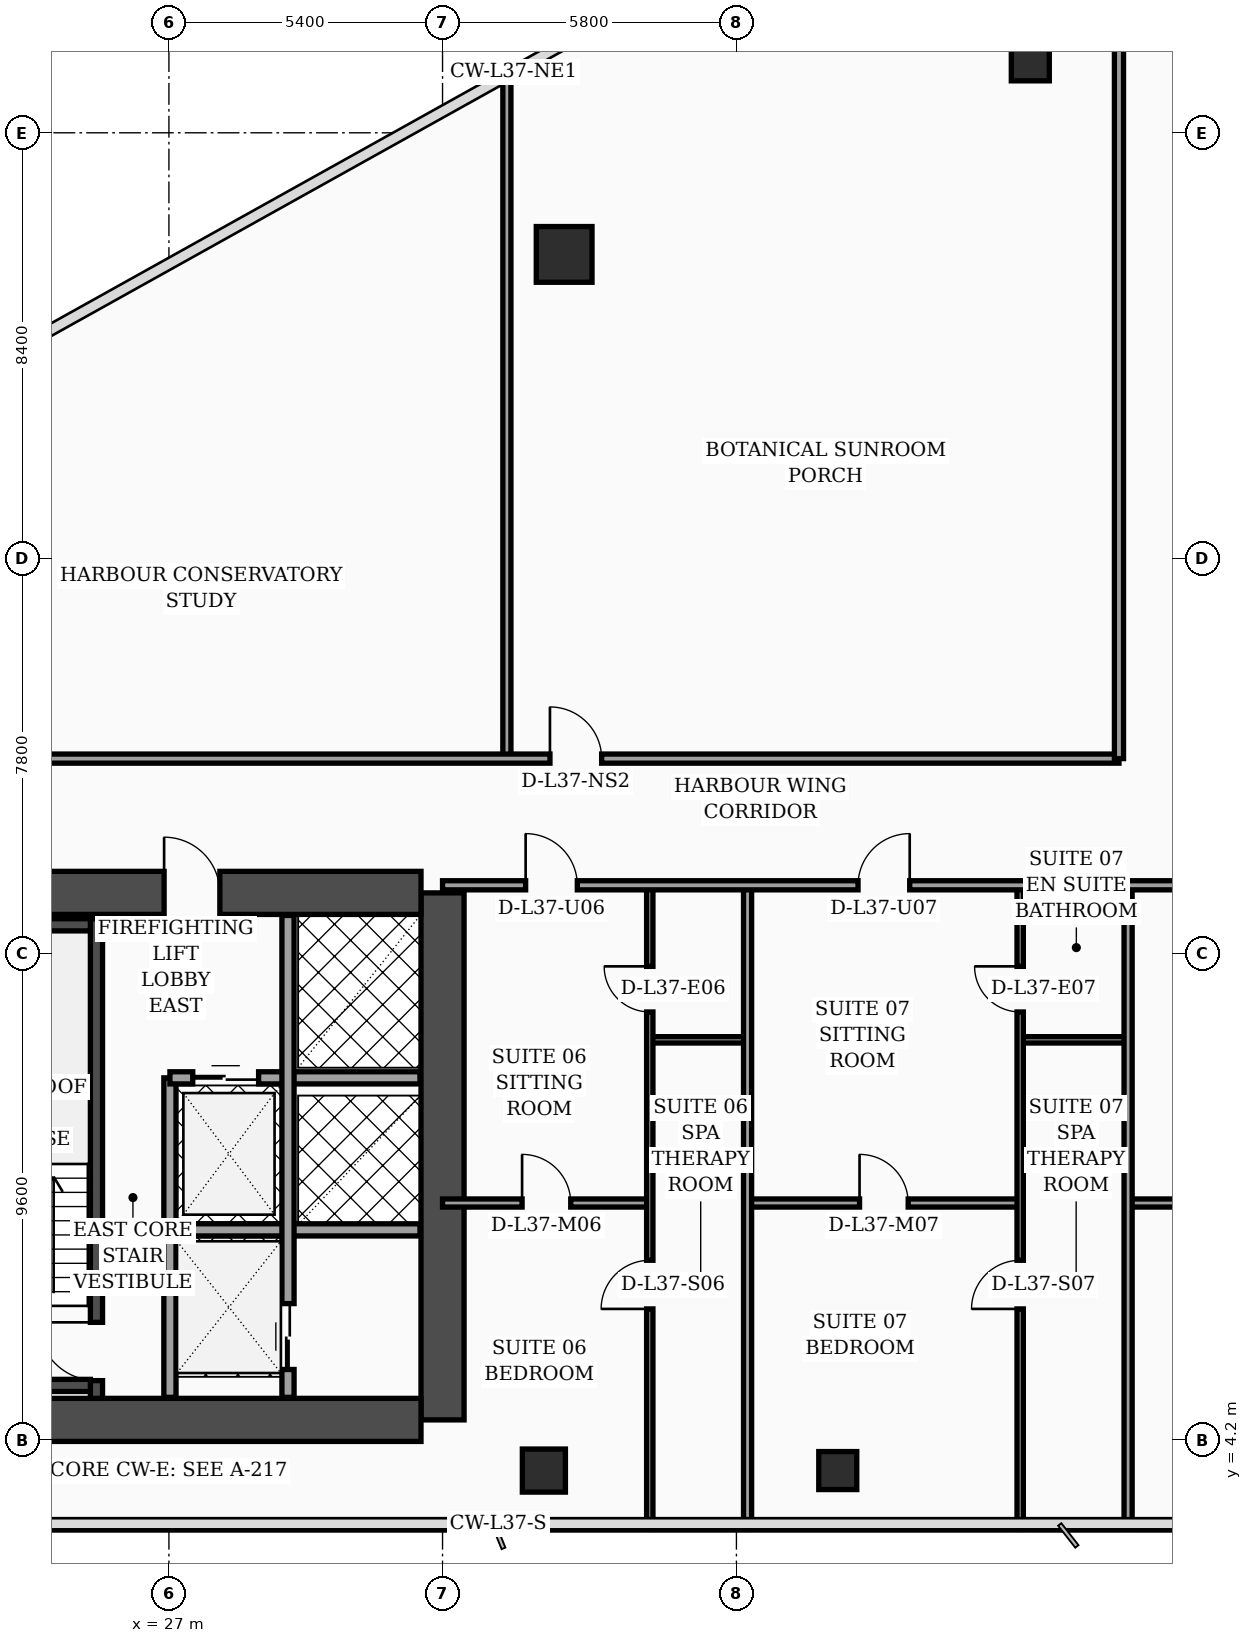
"""IFC4 building model, lengths in metres.
Left out: names, types, materials, properties, quantities, classifications, styles, units other than length and angle.
Written with IfcOpenShell. Run it as: python <this file> out.ifc"""

import sys

from ifc_helpers import new_model, si_unit, direction, frame, frame_2d, origin, origin_2d, place, context, subcontext, project, spatial, rectangle, hollow_rectangle, circle, extrude, element, fill, save


model = new_model("IFC4")
c1 = context("Model", 3, precision=1e-05, world=origin(), true_north=direction((0.0, 1.0)))
c2 = subcontext(c1, "Body", "Model", "MODEL_VIEW")
j1 = project(units=[si_unit("LENGTHUNIT", "METRE"), si_unit("PLANEANGLEUNIT", "RADIAN")], contexts=[c1])
p1 = place(None, origin())
s1 = spatial("IfcSite", under=j1, at=p1, CompositionType="ELEMENT")
p2 = place(p1, origin())
s2 = spatial("IfcBuilding", under=s1, at=p2, CompositionType="ELEMENT")
p3 = place(p2, frame((0.0, 0.0, 152.3)))
s3 = spatial("IfcBuildingStorey", under=s2, at=p3, CompositionType="ELEMENT", Elevation=152.3)
p4 = place(p3, frame((32.4, 4.6, 0.0), z_axis=(0.0, 0.0, 1.0), x_axis=(0.0, 1.0, 0.0)))
e1 = element("IfcWall", 1, at=p4, inside=s3, PredefinedType="SHEAR", context=c2, shape_type="SweptSolid", body=[
    extrude(rectangle(XDim=10.4, YDim=0.85, at=frame_2d((5.2, 0.0))), origin(), (0.0, 0.0, 1.0), 3.56),
])
p5 = place(p3, frame((22.025, 15.0, 0.0), z_axis=(0.0, 0.0, 1.0), x_axis=(1.0, 0.0, 0.0)))
e2 = element("IfcWall", 2, at=p5, inside=s3, PredefinedType="SHEAR", context=c2, shape_type="SweptSolid", body=[
    extrude(rectangle(XDim=9.95, YDim=0.85, at=frame_2d((4.975, 0.0))), origin(), (0.0, 0.0, 1.0), 3.56),
])
p6 = place(p5, frame((4.88, 0.0, 0.0)))
e3 = element("IfcOpeningElement", 3, at=p6, cuts=e2, PredefinedType="OPENING", context=c2, shape_type="SweptSolid", body=[
    extrude(rectangle(XDim=1.1, YDim=2.2, at=frame_2d((0.55, 1.1))), frame((0.0, 0.435, 0.0), z_axis=(0.0, -1.0, 0.0), x_axis=(1.0, 0.0, 0.0)), (0.0, 0.0, 1.0), 0.87),
])
p7 = place(p3, frame((22.025, 4.6, 0.0), z_axis=(0.0, 0.0, 1.0), x_axis=(1.0, 0.0, 0.0)))
e4 = element("IfcWall", 4, at=p7, inside=s3, PredefinedType="SHEAR", context=c2, shape_type="SweptSolid", body=[
    extrude(rectangle(XDim=9.95, YDim=0.85, at=frame_2d((4.975, 0.0))), origin(), (0.0, 0.0, 1.0), 3.56),
])
p8 = place(p3, frame((25.57, 5.025, 0.0), z_axis=(0.0, 0.0, 1.0), x_axis=(0.0, 1.0, 0.0)))
e5 = element("IfcWall", 5, at=p8, inside=s3, PredefinedType="SOLIDWALL", context=c2, shape_type="SweptSolid", body=[
    extrude(rectangle(XDim=9.465, YDim=0.24, at=frame_2d((4.732, 0.0))), origin(), (0.0, 0.0, 1.0), 3.56),
])
p9 = place(p8, frame((0.35, 0.0, 0.0)))
e6 = element("IfcOpeningElement", 6, at=p9, cuts=e5, PredefinedType="OPENING", context=c2, shape_type="SweptSolid", body=[
    extrude(rectangle(XDim=1.15, YDim=2.2, at=frame_2d((0.575, 1.1))), frame((0.0, 0.13, 0.0), z_axis=(0.0, -1.0, 0.0), x_axis=(1.0, 0.0, 0.0)), (0.0, 0.0, 1.0), 0.26),
])
for number, where, z_axis, x_axis in (
    (7, (22.35, 5.28, 0.0), (0.0, 0.0, 1.0), (1.0, 0.0, 0.0)),
    (8, (22.35, 14.37, 0.0), (0.0, 0.0, 1.0), (1.0, 0.0, 0.0)),
):
    element("IfcWall", number, at=place(p3, frame(where, z_axis=z_axis, x_axis=x_axis)), inside=s3, PredefinedType="SOLIDWALL", context=c2, shape_type="SweptSolid", body=[
        extrude(rectangle(XDim=3.1, YDim=0.24, at=frame_2d((1.55, 0.0))), origin(), (0.0, 0.0, 1.0), 3.56),
    ])
p10 = place(p3, frame((34.4, 3.6, 0.0), z_axis=(0.0, 0.0, 1.0), x_axis=(1.0, 0.0, 0.0)))
e9 = element("IfcColumn", 9, at=p10, inside=s3, PredefinedType="COLUMN", context=c2, shape_type="SweptSolid", body=[
    extrude(hollow_rectangle(XDim=0.85, YDim=0.85, WallThickness=0.036, at=origin_2d()), origin(), (0.0, 0.0, 1.0), 3.56),
])
p11 = place(p3, frame((40.2, 3.6, 0.0), z_axis=(0.0, 0.0, 1.0), x_axis=(1.0, 0.0, 0.0)))
e10 = element("IfcColumn", 10, at=p11, inside=s3, PredefinedType="COLUMN", context=c2, shape_type="SweptSolid", body=[
    extrude(hollow_rectangle(XDim=0.75, YDim=0.75, WallThickness=0.032, at=origin_2d()), origin(), (0.0, 0.0, 1.0), 3.56),
])
p12 = place(p3, frame((34.8, 27.6, 0.0), z_axis=(0.0, 0.0, 1.0), x_axis=(1.0, 0.0, 0.0)))
e11 = element("IfcColumn", 11, at=p12, inside=s3, PredefinedType="COLUMN", context=c2, shape_type="SweptSolid", body=[
    extrude(circle(Radius=0.55, at=origin_2d()), origin(), (0.0, 0.0, 1.0), 3.56),
])
p13 = place(p3, frame((44.0, 31.4, 0.0), z_axis=(0.0, 0.0, 1.0), x_axis=(1.0, 0.0, 0.0)))
e12 = element("IfcColumn", 12, at=p13, inside=s3, PredefinedType="COLUMN", context=c2, shape_type="SweptSolid", body=[
    extrude(hollow_rectangle(XDim=0.75, YDim=0.75, WallThickness=0.032, at=origin_2d()), origin(), (0.0, 0.0, 1.0), 3.56),
])
p14 = place(p3, frame((27.02, 5.045, 0.0), z_axis=(0.0, 0.0, 1.0), x_axis=(0.0, 1.0, 0.0)))
e13 = element("IfcWall", 13, at=p14, inside=s3, PredefinedType="SOLIDWALL", context=c2, shape_type="SweptSolid", body=[
    extrude(rectangle(XDim=6.305, YDim=0.24, at=frame_2d((3.153, 0.0))), origin(), (0.0, 0.0, 1.0), 3.56),
])
p15 = place(p3, frame((27.02, 11.35, 0.0), z_axis=(0.0, 0.0, 1.0), x_axis=(1.0, 0.0, 0.0)))
e14 = element("IfcWall", 14, at=p15, inside=s3, PredefinedType="SOLIDWALL", context=c2, shape_type="SweptSolid", body=[
    extrude(rectangle(XDim=4.935, YDim=0.24, at=frame_2d((2.468, 0.0))), origin(), (0.0, 0.0, 1.0), 3.56),
])
p16 = place(p15, frame((0.45, 0.0, 0.0)))
e15 = element("IfcOpeningElement", 15, at=p16, cuts=e14, PredefinedType="OPENING", context=c2, shape_type="SweptSolid", body=[
    extrude(rectangle(XDim=1.3, YDim=2.35, at=frame_2d((0.65, 1.175))), frame((0.0, 0.13, 0.0), z_axis=(0.0, -1.0, 0.0), x_axis=(1.0, 0.0, 0.0)), (0.0, 0.0, 1.0), 0.26),
])
p17 = place(p3, frame((27.02, 8.35, 0.0), z_axis=(0.0, 0.0, 1.0), x_axis=(1.0, 0.0, 0.0)))
e16 = element("IfcWall", 16, at=p17, inside=s3, PredefinedType="SOLIDWALL", context=c2, shape_type="SweptSolid", body=[
    extrude(rectangle(XDim=4.935, YDim=0.24, at=frame_2d((2.468, 0.0))), origin(), (0.0, 0.0, 1.0), 3.56),
])
p18 = place(p3, frame((29.35, 5.045, 0.0), z_axis=(0.0, 0.0, 1.0), x_axis=(0.0, 1.0, 0.0)))
e17 = element("IfcWall", 17, at=p18, inside=s3, PredefinedType="SOLIDWALL", context=c2, shape_type="SweptSolid", body=[
    extrude(rectangle(XDim=9.51, YDim=0.24, at=frame_2d((4.755, 0.0))), origin(), (0.0, 0.0, 1.0), 3.56),
])
p19 = place(p18, frame((0.55, 0.0, 0.0)))
e18 = element("IfcOpeningElement", 18, at=p19, cuts=e17, PredefinedType="OPENING", context=c2, shape_type="SweptSolid", body=[
    extrude(rectangle(XDim=1.3, YDim=2.35, at=frame_2d((0.65, 1.175))), frame((0.0, 0.13, 0.0), z_axis=(0.0, -1.0, 0.0), x_axis=(1.0, 0.0, 0.0)), (0.0, 0.0, 1.0), 0.26),
])
p20 = place(p3, frame((36.49, 12.1, 0.0), z_axis=(0.0, 0.0, 1.0), x_axis=(1.0, 0.0, 0.0)))
e19 = element("IfcWall", 19, at=p20, inside=s3, PredefinedType="PARTITIONING", context=c2, shape_type="SweptSolid", body=[
    extrude(rectangle(XDim=1.93, YDim=0.125, at=frame_2d((0.965, 0.0))), origin(), (0.0, 0.0, 1.0), 3.56),
])
p21 = place(p3, frame((32.4, 8.88, 0.0), z_axis=(0.0, 0.0, 1.0), x_axis=(1.0, 0.0, 0.0)))
e20 = element("IfcWall", 20, at=p21, inside=s3, PredefinedType="PARTITIONING", context=c2, shape_type="SweptSolid", body=[
    extrude(rectangle(XDim=4.09, YDim=0.16, at=frame_2d((2.045, 0.0))), origin(), (0.0, 0.0, 1.0), 2.94),
])
p22 = place(p21, frame((1.57, 0.0, 0.0)))
e21 = element("IfcOpeningElement", 21, at=p22, cuts=e20, PredefinedType="OPENING", context=c2, shape_type="SweptSolid", body=[
    extrude(rectangle(XDim=0.96, YDim=2.2, at=frame_2d((0.48, 1.1))), frame((0.0, 0.09, 0.0), z_axis=(0.0, -1.0, 0.0), x_axis=(1.0, 0.0, 0.0)), (0.0, 0.0, 1.0), 0.18),
])
p23 = place(p3, frame((36.49, 2.44, 0.0), z_axis=(0.0, 0.0, 1.0), x_axis=(0.0, 1.0, 0.0)))
e22 = element("IfcWall", 22, at=p23, inside=s3, PredefinedType="PARTITIONING", context=c2, shape_type="SweptSolid", body=[
    extrude(rectangle(XDim=12.71, YDim=0.125, at=frame_2d((6.355, 0.0))), origin(), (0.0, 0.0, 1.0), 2.94),
])
p24 = place(p23, frame((4.35, 0.0, 0.0)))
e23 = element("IfcOpeningElement", 23, at=p24, cuts=e22, PredefinedType="OPENING", context=c2, shape_type="SweptSolid", body=[
    extrude(rectangle(XDim=0.96, YDim=2.2, at=frame_2d((0.48, 1.1))), frame((0.0, 0.073, 0.0), z_axis=(0.0, -1.0, 0.0), x_axis=(1.0, 0.0, 0.0)), (0.0, 0.0, 1.0), 0.145),
])
p25 = place(p23, frame((10.21, 0.0, 0.0)))
e24 = element("IfcOpeningElement", 24, at=p25, cuts=e22, PredefinedType="OPENING", context=c2, shape_type="SweptSolid", body=[
    extrude(rectangle(XDim=0.9, YDim=2.15, at=frame_2d((0.45, 1.075))), frame((0.0, 0.073, 0.0), z_axis=(0.0, -1.0, 0.0), x_axis=(1.0, 0.0, 0.0)), (0.0, 0.0, 1.0), 0.145),
])
p26 = place(p3, frame((43.8, 12.1, 0.0), z_axis=(0.0, 0.0, 1.0), x_axis=(1.0, 0.0, 0.0)))
e25 = element("IfcWall", 25, at=p26, inside=s3, PredefinedType="PARTITIONING", context=c2, shape_type="SweptSolid", body=[
    extrude(rectangle(XDim=2.13, YDim=0.125, at=frame_2d((1.065, 0.0))), origin(), (0.0, 0.0, 1.0), 3.56),
])
p27 = place(p3, frame((38.42, 8.88, 0.0), z_axis=(0.0, 0.0, 1.0), x_axis=(1.0, 0.0, 0.0)))
e26 = element("IfcWall", 26, at=p27, inside=s3, PredefinedType="PARTITIONING", context=c2, shape_type="SweptSolid", body=[
    extrude(rectangle(XDim=5.38, YDim=0.16, at=frame_2d((2.69, 0.0))), origin(), (0.0, 0.0, 1.0), 3.56),
])
p28 = place(p27, frame((2.21, 0.0, 0.0)))
e27 = element("IfcOpeningElement", 27, at=p28, cuts=e26, PredefinedType="OPENING", context=c2, shape_type="SweptSolid", body=[
    extrude(rectangle(XDim=0.96, YDim=2.2, at=frame_2d((0.48, 1.1))), frame((0.0, 0.09, 0.0), z_axis=(0.0, -1.0, 0.0), x_axis=(1.0, 0.0, 0.0)), (0.0, 0.0, 1.0), 0.18),
])
p29 = place(p3, frame((43.8, 2.44, 0.0), z_axis=(0.0, 0.0, 1.0), x_axis=(0.0, 1.0, 0.0)))
e28 = element("IfcWall", 28, at=p29, inside=s3, PredefinedType="PARTITIONING", context=c2, shape_type="SweptSolid", body=[
    extrude(rectangle(XDim=12.71, YDim=0.125, at=frame_2d((6.355, 0.0))), origin(), (0.0, 0.0, 1.0), 3.04),
])
p30 = place(p29, frame((4.35, 0.0, 0.0)))
e29 = element("IfcOpeningElement", 29, at=p30, cuts=e28, PredefinedType="OPENING", context=c2, shape_type="SweptSolid", body=[
    extrude(rectangle(XDim=0.96, YDim=2.2, at=frame_2d((0.48, 1.1))), frame((0.0, 0.073, 0.0), z_axis=(0.0, -1.0, 0.0), x_axis=(1.0, 0.0, 0.0)), (0.0, 0.0, 1.0), 0.145),
])
p31 = place(p29, frame((10.21, 0.0, 0.0)))
e30 = element("IfcOpeningElement", 30, at=p31, cuts=e28, PredefinedType="OPENING", context=c2, shape_type="SweptSolid", body=[
    extrude(rectangle(XDim=0.9, YDim=2.15, at=frame_2d((0.45, 1.075))), frame((0.0, 0.073, 0.0), z_axis=(0.0, -1.0, 0.0), x_axis=(1.0, 0.0, 0.0)), (0.0, 0.0, 1.0), 0.145),
])
p32 = place(p3, frame((38.42, 2.44, 0.0), z_axis=(0.0, 0.0, 1.0), x_axis=(0.0, 1.0, 0.0)))
e31 = element("IfcWall", 31, at=p32, inside=s3, PredefinedType="PARTITIONING", context=c2, shape_type="SweptSolid", body=[
    extrude(rectangle(XDim=12.71, YDim=0.16, at=frame_2d((6.355, 0.0))), origin(), (0.0, 0.0, 1.0), 2.94),
])
p33 = place(p3, frame((45.93, 8.88, 0.0), z_axis=(0.0, 0.0, 1.0), x_axis=(1.0, 0.0, 0.0)))
e32 = element("IfcWall", 32, at=p33, inside=s3, PredefinedType="PARTITIONING", context=c2, shape_type="SweptSolid", body=[
    extrude(rectangle(XDim=4.74, YDim=0.16, at=frame_2d((2.37, 0.0))), origin(), (0.0, 0.0, 1.0), 2.94),
])
p34 = place(p33, frame((1.89, 0.0, 0.0)))
e33 = element("IfcOpeningElement", 33, at=p34, cuts=e32, PredefinedType="OPENING", context=c2, shape_type="SweptSolid", body=[
    extrude(rectangle(XDim=0.96, YDim=2.2, at=frame_2d((0.48, 1.1))), frame((0.0, 0.09, 0.0), z_axis=(0.0, -1.0, 0.0), x_axis=(1.0, 0.0, 0.0)), (0.0, 0.0, 1.0), 0.18),
])
p35 = place(p3, frame((45.93, 2.44, 0.0), z_axis=(0.0, 0.0, 1.0), x_axis=(0.0, 1.0, 0.0)))
e34 = element("IfcWall", 34, at=p35, inside=s3, PredefinedType="PARTITIONING", context=c2, shape_type="SweptSolid", body=[
    extrude(rectangle(XDim=12.71, YDim=0.16, at=frame_2d((6.355, 0.0))), origin(), (0.0, 0.0, 1.0), 3.04),
])
p36 = place(p3, frame((32.4, 15.15, 0.0), z_axis=(0.0, 0.0, 1.0), x_axis=(1.0, 0.0, 0.0)))
e35 = element("IfcWall", 35, at=p36, inside=s3, PredefinedType="PARTITIONING", context=c2, shape_type="SweptSolid", body=[
    extrude(rectangle(XDim=20.2, YDim=0.18, at=frame_2d((10.1, 0.0))), origin(), (0.0, 0.0, 1.0), 2.94),
])
p37 = place(p36, frame((1.64, 0.0, 0.0)))
e36 = element("IfcOpeningElement", 36, at=p37, cuts=e35, PredefinedType="OPENING", context=c2, shape_type="SweptSolid", body=[
    extrude(rectangle(XDim=1.02, YDim=2.2, at=frame_2d((0.51, 1.1))), frame((0.0, 0.1, 0.0), z_axis=(0.0, -1.0, 0.0), x_axis=(1.0, 0.0, 0.0)), (0.0, 0.0, 1.0), 0.2),
])
p38 = place(p36, frame((8.2, 0.0, 0.0)))
e37 = element("IfcOpeningElement", 37, at=p38, cuts=e35, PredefinedType="OPENING", context=c2, shape_type="SweptSolid", body=[
    extrude(rectangle(XDim=1.02, YDim=2.2, at=frame_2d((0.51, 1.1))), frame((0.0, 0.1, 0.0), z_axis=(0.0, -1.0, 0.0), x_axis=(1.0, 0.0, 0.0)), (0.0, 0.0, 1.0), 0.2),
])
p39 = place(p36, frame((15.39, 0.0, 0.0)))
e38 = element("IfcOpeningElement", 38, at=p39, cuts=e35, PredefinedType="OPENING", context=c2, shape_type="SweptSolid", body=[
    extrude(rectangle(XDim=1.02, YDim=2.2, at=frame_2d((0.51, 1.1))), frame((0.0, 0.1, 0.0), z_axis=(0.0, -1.0, 0.0), x_axis=(1.0, 0.0, 0.0)), (0.0, 0.0, 1.0), 0.2),
])
p40 = place(p3, frame((33.67, 17.65, 0.0), z_axis=(0.0, 0.0, 1.0), x_axis=(0.0, 1.0, 0.0)))
e39 = element("IfcWall", 39, at=p40, inside=s3, PredefinedType="PARTITIONING", context=c2, shape_type="SweptSolid", body=[
    extrude(rectangle(XDim=13.56, YDim=0.16, at=frame_2d((6.78, 0.0))), origin(), (0.0, 0.0, 1.0), 2.94),
])
p41 = place(p3, frame((21.5, 17.65, 0.0), z_axis=(0.0, 0.0, 1.0), x_axis=(1.0, 0.0, 0.0)))
e40 = element("IfcWall", 40, at=p41, inside=s3, PredefinedType="PARTITIONING", context=c2, shape_type="SweptSolid", body=[
    extrude(rectangle(XDim=24.25, YDim=0.18, at=frame_2d((12.125, 0.0))), origin(), (0.0, 0.0, 1.0), 2.94),
])
p42 = place(p41, frame((0.95, 0.0, 0.0)))
e41 = element("IfcOpeningElement", 41, at=p42, cuts=e40, PredefinedType="OPENING", context=c2, shape_type="SweptSolid", body=[
    extrude(rectangle(XDim=1.02, YDim=2.2, at=frame_2d((0.51, 1.1))), frame((0.0, 0.1, 0.0), z_axis=(0.0, -1.0, 0.0), x_axis=(1.0, 0.0, 0.0)), (0.0, 0.0, 1.0), 0.2),
])
p43 = place(p41, frame((13.02, 0.0, 0.0)))
e42 = element("IfcOpeningElement", 42, at=p43, cuts=e40, PredefinedType="OPENING", context=c2, shape_type="SweptSolid", body=[
    extrude(rectangle(XDim=1.02, YDim=2.2, at=frame_2d((0.51, 1.1))), frame((0.0, 0.1, 0.0), z_axis=(0.0, -1.0, 0.0), x_axis=(1.0, 0.0, 0.0)), (0.0, 0.0, 1.0), 0.2),
])
p44 = place(p3, frame((45.75, 17.65, 0.0), z_axis=(0.0, 0.0, 1.0), x_axis=(0.0, 1.0, 0.0)))
e43 = element("IfcWall", 43, at=p44, inside=s3, PredefinedType="PARTITIONING", context=c2, shape_type="SweptSolid", body=[
    extrude(rectangle(XDim=20.29, YDim=0.18, at=frame_2d((10.145, 0.0))), origin(), (0.0, 0.0, 1.0), 2.94),
])
p45 = place(p16, origin())
e44 = element("IfcDoor", 44, at=p45, inside=s3, OperationType="DOUBLE_DOOR_SLIDING", PredefinedType="DOOR", context=c2, shape_type="SweptSolid", body=[
    extrude(rectangle(XDim=1.3, YDim=2.35, at=frame_2d((0.65, 1.175))), frame((0.0, 0.025, 0.0), z_axis=(0.0, -1.0, 0.0), x_axis=(1.0, 0.0, 0.0)), (0.0, 0.0, 1.0), 0.05),
])
fill(e15, e44)
p46 = place(p19, origin())
e45 = element("IfcDoor", 45, at=p46, inside=s3, OperationType="DOUBLE_DOOR_SLIDING", PredefinedType="DOOR", context=c2, shape_type="SweptSolid", body=[
    extrude(rectangle(XDim=1.3, YDim=2.35, at=frame_2d((0.65, 1.175))), frame((0.0, 0.025, 0.0), z_axis=(0.0, -1.0, 0.0), x_axis=(1.0, 0.0, 0.0)), (0.0, 0.0, 1.0), 0.05),
])
fill(e18, e45)
p47 = place(p22, origin())
e46 = element("IfcDoor", 46, at=p47, inside=s3, OperationType="SINGLE_SWING_LEFT", PredefinedType="DOOR", context=c2, shape_type="SweptSolid", body=[
    extrude(rectangle(XDim=0.96, YDim=2.2, at=frame_2d((0.48, 1.1))), frame((0.0, 0.025, 0.0), z_axis=(0.0, -1.0, 0.0), x_axis=(1.0, 0.0, 0.0)), (0.0, 0.0, 1.0), 0.05),
])
fill(e21, e46)
p48 = place(p24, origin())
e47 = element("IfcDoor", 47, at=p48, inside=s3, OperationType="SINGLE_SWING_LEFT", PredefinedType="DOOR", context=c2, shape_type="SweptSolid", body=[
    extrude(rectangle(XDim=0.96, YDim=2.2, at=frame_2d((0.48, 1.1))), frame((0.0, 0.025, 0.0), z_axis=(0.0, -1.0, 0.0), x_axis=(1.0, 0.0, 0.0)), (0.0, 0.0, 1.0), 0.05),
])
fill(e23, e47)
p49 = place(p25, origin())
e48 = element("IfcDoor", 48, at=p49, inside=s3, OperationType="SINGLE_SWING_RIGHT", PredefinedType="DOOR", context=c2, shape_type="SweptSolid", body=[
    extrude(rectangle(XDim=0.9, YDim=2.15, at=frame_2d((0.45, 1.075))), frame((0.0, 0.025, 0.0), z_axis=(0.0, -1.0, 0.0), x_axis=(1.0, 0.0, 0.0)), (0.0, 0.0, 1.0), 0.05),
])
fill(e24, e48)
p50 = place(p28, origin())
e49 = element("IfcDoor", 49, at=p50, inside=s3, OperationType="SINGLE_SWING_LEFT", PredefinedType="DOOR", context=c2, shape_type="SweptSolid", body=[
    extrude(rectangle(XDim=0.96, YDim=2.2, at=frame_2d((0.48, 1.1))), frame((0.0, 0.025, 0.0), z_axis=(0.0, -1.0, 0.0), x_axis=(1.0, 0.0, 0.0)), (0.0, 0.0, 1.0), 0.05),
])
fill(e27, e49)
p51 = place(p30, origin())
e50 = element("IfcDoor", 50, at=p51, inside=s3, OperationType="SINGLE_SWING_LEFT", PredefinedType="DOOR", context=c2, shape_type="SweptSolid", body=[
    extrude(rectangle(XDim=0.96, YDim=2.2, at=frame_2d((0.48, 1.1))), frame((0.0, 0.025, 0.0), z_axis=(0.0, -1.0, 0.0), x_axis=(1.0, 0.0, 0.0)), (0.0, 0.0, 1.0), 0.05),
])
fill(e29, e50)
p52 = place(p31, origin())
e51 = element("IfcDoor", 51, at=p52, inside=s3, OperationType="SINGLE_SWING_RIGHT", PredefinedType="DOOR", context=c2, shape_type="SweptSolid", body=[
    extrude(rectangle(XDim=0.9, YDim=2.15, at=frame_2d((0.45, 1.075))), frame((0.0, 0.025, 0.0), z_axis=(0.0, -1.0, 0.0), x_axis=(1.0, 0.0, 0.0)), (0.0, 0.0, 1.0), 0.05),
])
fill(e30, e51)
p53 = place(p37, origin())
e52 = element("IfcDoor", 52, at=p53, inside=s3, OperationType="SINGLE_SWING_LEFT", PredefinedType="DOOR", context=c2, shape_type="SweptSolid", body=[
    extrude(rectangle(XDim=1.02, YDim=2.2, at=frame_2d((0.51, 1.1))), frame((0.0, 0.025, 0.0), z_axis=(0.0, -1.0, 0.0), x_axis=(1.0, 0.0, 0.0)), (0.0, 0.0, 1.0), 0.05),
])
fill(e36, e52)
p54 = place(p38, origin())
e53 = element("IfcDoor", 53, at=p54, inside=s3, OperationType="SINGLE_SWING_RIGHT", PredefinedType="DOOR", context=c2, shape_type="SweptSolid", body=[
    extrude(rectangle(XDim=1.02, YDim=2.2, at=frame_2d((0.51, 1.1))), frame((0.0, 0.025, 0.0), z_axis=(0.0, -1.0, 0.0), x_axis=(1.0, 0.0, 0.0)), (0.0, 0.0, 1.0), 0.05),
])
fill(e37, e53)
p55 = place(p43, origin())
e54 = element("IfcDoor", 54, at=p55, inside=s3, OperationType="SINGLE_SWING_LEFT", PredefinedType="DOOR", context=c2, shape_type="SweptSolid", body=[
    extrude(rectangle(XDim=1.02, YDim=2.2, at=frame_2d((0.51, 1.1))), frame((0.0, 0.025, 0.0), z_axis=(0.0, -1.0, 0.0), x_axis=(1.0, 0.0, 0.0)), (0.0, 0.0, 1.0), 0.05),
])
fill(e42, e54)
p56 = place(p9, origin())
e55 = element("IfcDoor", 55, at=p56, inside=s3, OperationType="SINGLE_SWING_RIGHT", PredefinedType="DOOR", context=c2, shape_type="SweptSolid", body=[
    extrude(rectangle(XDim=1.15, YDim=2.2, at=frame_2d((0.575, 1.1))), frame((0.0, 0.025, 0.0), z_axis=(0.0, -1.0, 0.0), x_axis=(1.0, 0.0, 0.0)), (0.0, 0.0, 1.0), 0.05),
])
fill(e6, e55)
p57 = place(p6, origin())
e56 = element("IfcDoor", 56, at=p57, inside=s3, OperationType="SINGLE_SWING_LEFT", PredefinedType="DOOR", context=c2, shape_type="SweptSolid", body=[
    extrude(rectangle(XDim=1.1, YDim=2.2, at=frame_2d((0.55, 1.1))), frame((0.0, 0.025, 0.0), z_axis=(0.0, -1.0, 0.0), x_axis=(1.0, 0.0, 0.0)), (0.0, 0.0, 1.0), 0.05),
])
fill(e3, e56)
save(model, sys.argv[1])
